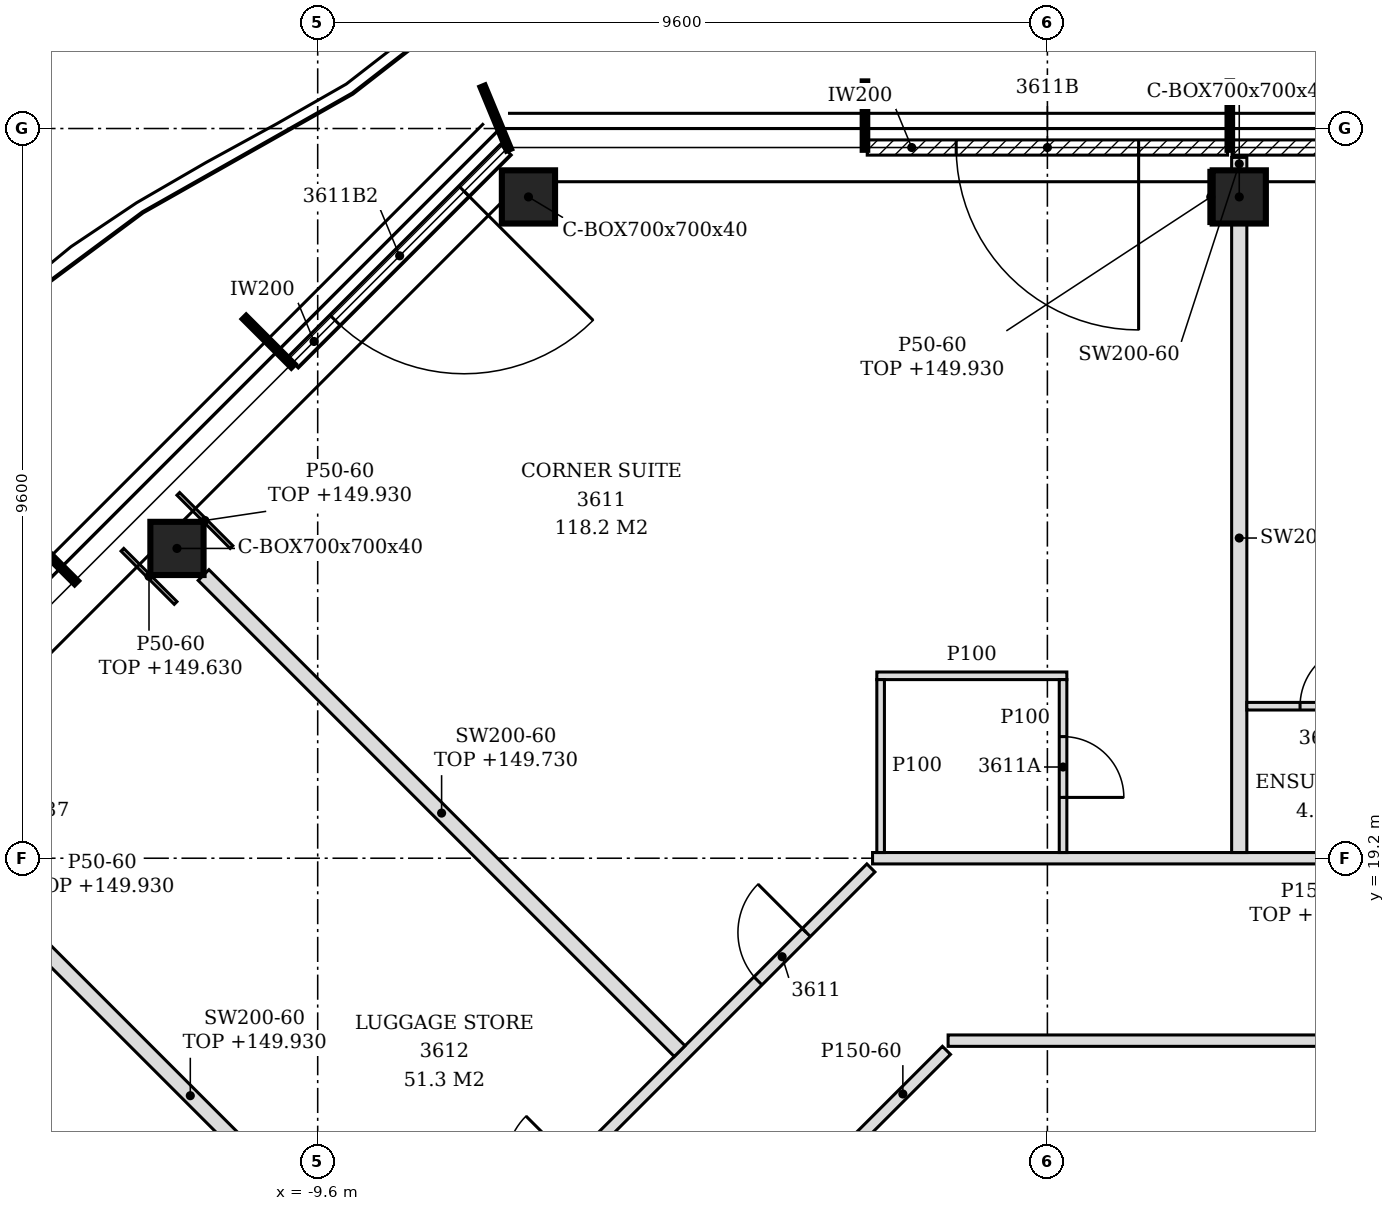
"""IFC4 building model, lengths in metres.
Left out: names, types, materials, properties, quantities, classifications, styles, units other than length and angle.
Written with IfcOpenShell. Run it as: python <this file> out.ifc"""

import sys

from ifc_helpers import new_model, si_unit, direction, frame, frame_2d, origin, origin_2d, place, context, subcontext, project, spatial, polyline, rectangle, hollow_rectangle, outline, extrude, element, fill, save


model = new_model("IFC4")
c1 = context("Model", 3, precision=1e-05, world=origin(), true_north=direction((0.0, 1.0)))
c2 = subcontext(c1, "Body", "Model", "MODEL_VIEW")
j1 = project(units=[si_unit("LENGTHUNIT", "METRE"), si_unit("PLANEANGLEUNIT", "RADIAN")], contexts=[c1])
p1 = place(None, origin())
s1 = spatial("IfcSite", under=j1, at=p1, CompositionType="ELEMENT")
p2 = place(p1, origin())
s2 = spatial("IfcBuilding", under=s1, at=p2, CompositionType="ELEMENT")
p3 = place(p2, frame((0.0, 0.0, 147.0)))
s3 = spatial("IfcBuildingStorey", under=s2, at=p3, CompositionType="ELEMENT", Elevation=147.0)
for number, where, z_axis, x_axis in (
    (1, (2.524, 27.9, -0.15), (0.0, 0.0, 1.0), (1.0, 0.0, 0.0)),
    (2, (-6.827, 27.9, -0.15), (0.0, 0.0, 1.0), (1.0, 0.0, 0.0)),
    (3, (-11.451, 23.276, -0.15), (0.0, 0.0, 1.0), (1.0, 0.0, 0.0)),
):
    element("IfcColumn", number, at=place(p3, frame(where, z_axis=z_axis, x_axis=x_axis)), inside=s3, PredefinedType="COLUMN", context=c2, shape_type="SweptSolid", body=[
        extrude(hollow_rectangle(XDim=0.7, YDim=0.7, WallThickness=0.04, at=origin_2d()), origin(), (0.0, 0.0, 1.0), 3.6),
    ])
p4 = place(p3, frame((7.17, 28.55, 0.0), z_axis=(0.0, 0.0, 1.0), x_axis=(-1.0, 0.0, 0.0)))
e4 = element("IfcWall", 4, at=p4, inside=s3, PredefinedType="NOTDEFINED", context=c2, shape_type="SweptSolid", body=[
    extrude(rectangle(XDim=4.74, YDim=0.2, at=frame_2d((2.37, 0.0))), origin(), (0.0, 0.0, 1.0), 3.45),
])
p5 = place(p4, frame((1.17, 0.0, 0.0)))
e5 = element("IfcOpeningElement", 5, at=p5, cuts=e4, PredefinedType="OPENING", context=c2, shape_type="SweptSolid", body=[
    extrude(rectangle(XDim=2.4, YDim=2.4, at=frame_2d((1.2, 1.2))), frame((0.0, 0.11, 0.0), z_axis=(0.0, -1.0, 0.0), x_axis=(1.0, 0.0, 0.0)), (0.0, 0.0, 1.0), 0.22),
])
p6 = place(p3, frame((2.37, 28.55, 0.0), z_axis=(0.0, 0.0, 1.0), x_axis=(-1.0, 0.0, 0.0)))
e6 = element("IfcWall", 6, at=p6, inside=s3, PredefinedType="NOTDEFINED", context=c2, shape_type="SweptSolid", body=[
    extrude(rectangle(XDim=4.74, YDim=0.2, at=frame_2d((2.37, 0.0))), origin(), (0.0, 0.0, 1.0), 3.45),
])
p7 = place(p6, frame((1.17, 0.0, 0.0)))
e7 = element("IfcOpeningElement", 7, at=p7, cuts=e6, PredefinedType="OPENING", context=c2, shape_type="SweptSolid", body=[
    extrude(rectangle(XDim=2.4, YDim=2.4, at=frame_2d((1.2, 1.2))), frame((0.0, 0.11, 0.0), z_axis=(0.0, -1.0, 0.0), x_axis=(1.0, 0.0, 0.0)), (0.0, 0.0, 1.0), 0.22),
])
p8 = place(p3, frame((-7.125, 28.522, 0.0), z_axis=(0.0, 0.0, 1.0), x_axis=(-0.707106781187, -0.707106781187, 0.0)))
e8 = element("IfcWall", 8, at=p8, inside=s3, PredefinedType="NOTDEFINED", context=c2, shape_type="SweptSolid", body=[
    extrude(rectangle(XDim=3.962, YDim=0.2, at=frame_2d((1.981, 0.0))), origin(), (0.0, 0.0, 1.0), 3.45),
])
p9 = place(p8, frame((0.775, 0.0, 0.0)))
e9 = element("IfcOpeningElement", 9, at=p9, cuts=e8, PredefinedType="OPENING", context=c2, shape_type="SweptSolid", body=[
    extrude(rectangle(XDim=2.4, YDim=2.4, at=frame_2d((1.2, 1.2))), frame((0.0, 0.11, 0.0), z_axis=(0.0, -1.0, 0.0), x_axis=(1.0, 0.0, 0.0)), (0.0, 0.0, 1.0), 0.22),
])
p10 = place(p3, frame((-12.075, 9.319, 0.0), z_axis=(0.0, 0.0, 1.0), x_axis=(0.707106781187, 0.707106781187, 0.0)))
e10 = element("IfcWall", 10, at=p10, inside=s3, PredefinedType="PARTITIONING", context=c2, shape_type="SweptSolid", body=[
    extrude(rectangle(XDim=13.793, YDim=0.15, at=frame_2d((6.896, 0.0))), origin(), (0.0, 0.0, 1.0), 2.73),
])
p11 = place(p10, frame((11.692, 0.0, 0.0)))
e11 = element("IfcOpeningElement", 11, at=p11, cuts=e10, PredefinedType="OPENING", context=c2, shape_type="SweptSolid", body=[
    extrude(rectangle(XDim=0.9, YDim=2.1, at=frame_2d((0.45, 1.05))), frame((0.0, 0.085, 0.0), z_axis=(0.0, -1.0, 0.0), x_axis=(1.0, 0.0, 0.0)), (0.0, 0.0, 1.0), 0.17),
])
p12 = place(p10, frame((7.376, 0.0, 0.0)))
e12 = element("IfcOpeningElement", 12, at=p12, cuts=e10, PredefinedType="OPENING", context=c2, shape_type="SweptSolid", body=[
    extrude(rectangle(XDim=0.9, YDim=2.1, at=frame_2d((0.45, 1.05))), frame((0.0, 0.085, 0.0), z_axis=(0.0, -1.0, 0.0), x_axis=(1.0, 0.0, 0.0)), (0.0, 0.0, 1.0), 0.17),
])
p13 = place(p10, frame((3.62, 0.0, 0.0)))
e13 = element("IfcOpeningElement", 13, at=p13, cuts=e10, PredefinedType="OPENING", context=c2, shape_type="SweptSolid", body=[
    extrude(rectangle(XDim=0.9, YDim=2.1, at=frame_2d((0.45, 1.05))), frame((0.0, 0.085, 0.0), z_axis=(0.0, -1.0, 0.0), x_axis=(1.0, 0.0, 0.0)), (0.0, 0.0, 1.0), 0.17),
])
p14 = place(p3, frame((-8.35, 13.15, 0.0), z_axis=(0.0, 0.0, 1.0), x_axis=(-0.707092030896, 0.707121531169, 0.0)))
e14 = element("IfcWall", 14, at=p14, inside=s3, PredefinedType="PARTITIONING", context=c2, shape_type="SweptSolid", body=[
    extrude(rectangle(XDim=8.276, YDim=0.2, at=frame_2d((4.138, 0.0))), origin(), (0.0, 0.0, 1.0), 2.93),
])
p15 = place(p3, frame((-2.475, 15.525, 0.0), z_axis=(0.0, 0.0, 1.0), x_axis=(0.707106781187, 0.707106781187, 0.0)))
e15 = element("IfcWall", 15, at=p15, inside=s3, PredefinedType="PARTITIONING", context=c2, shape_type="SweptSolid", body=[
    extrude(rectangle(XDim=1.622, YDim=0.15, at=frame_2d((0.811, 0.0))), origin(), (0.0, 0.0, 1.0), 3.45),
])
p16 = place(p3, frame((-4.838, 16.662, 0.0), z_axis=(0.0, 0.0, 1.0), x_axis=(-0.707120561855, 0.707093000249, 0.0)))
e16 = element("IfcWall", 16, at=p16, inside=s3, PredefinedType="PARTITIONING", context=c2, shape_type="SweptSolid", body=[
    extrude(rectangle(XDim=8.858, YDim=0.2, at=frame_2d((4.429, 0.0))), origin(), (0.0, 0.0, 1.0), 2.73),
])
p17 = place(p3, frame((-1.306, 16.8, 0.0), z_axis=(0.0, 0.0, 1.0), x_axis=(1.0, 0.0, 0.0)))
e17 = element("IfcWall", 17, at=p17, inside=s3, PredefinedType="PARTITIONING", context=c2, shape_type="SweptSolid", body=[
    extrude(outline(polyline([(0.0, 0.0), (16.806, 0.0), (16.806, 3.45), (8.656, 3.45), (8.654, 2.73), (8.356, 2.73), (8.354, 3.45), (0.0, 3.45), (0.0, 0.0)])), frame((0.0, 0.075, 0.0), z_axis=(0.0, -1.0, 0.0), x_axis=(1.0, 0.0, 0.0)), (0.0, 0.0, 1.0), 0.15),
])
p18 = place(p17, frame((15.006, 0.0, 0.0)))
e18 = element("IfcOpeningElement", 18, at=p18, cuts=e17, PredefinedType="OPENING", context=c2, shape_type="SweptSolid", body=[
    extrude(rectangle(XDim=0.8, YDim=2.1, at=frame_2d((0.4, 1.05))), frame((0.0, 0.085, 0.0), z_axis=(0.0, -1.0, 0.0), x_axis=(1.0, 0.0, 0.0)), (0.0, 0.0, 1.0), 0.17),
])
p19 = place(p17, frame((12.456, 0.0, 0.0)))
e19 = element("IfcOpeningElement", 19, at=p19, cuts=e17, PredefinedType="OPENING", context=c2, shape_type="SweptSolid", body=[
    extrude(rectangle(XDim=0.8, YDim=2.1, at=frame_2d((0.4, 1.05))), frame((0.0, 0.085, 0.0), z_axis=(0.0, -1.0, 0.0), x_axis=(1.0, 0.0, 0.0)), (0.0, 0.0, 1.0), 0.17),
])
p20 = place(p3, frame((-2.3, 19.2, 0.0), z_axis=(0.0, 0.0, 1.0), x_axis=(1.0, 0.0, 0.0)))
e20 = element("IfcWall", 20, at=p20, inside=s3, PredefinedType="PARTITIONING", context=c2, shape_type="SweptSolid", body=[
    extrude(outline(polyline([(0.0, 0.0), (19.0, 0.0), (19.0, 2.88), (9.65, 2.88), (9.648, 2.73), (9.35, 2.73), (9.348, 2.88), (0.0, 2.88), (0.0, 0.0)])), frame((0.0, 0.075, 0.0), z_axis=(0.0, -1.0, 0.0), x_axis=(1.0, 0.0, 0.0)), (0.0, 0.0, 1.0), 0.15),
])
p21 = place(p20, frame((11.809, 0.0, 0.0)))
e21 = element("IfcOpeningElement", 21, at=p21, cuts=e20, PredefinedType="OPENING", context=c2, shape_type="SweptSolid", body=[
    extrude(rectangle(XDim=0.9, YDim=2.1, at=frame_2d((0.45, 1.05))), frame((0.0, 0.085, 0.0), z_axis=(0.0, -1.0, 0.0), x_axis=(1.0, 0.0, 0.0)), (0.0, 0.0, 1.0), 0.17),
])
p22 = place(p3, frame((-2.194, 19.275, 0.0), z_axis=(0.0, 0.0, 1.0), x_axis=(0.0, 1.0, 0.0)))
e22 = element("IfcWall", 22, at=p22, inside=s3, PredefinedType="PARTITIONING", context=c2, shape_type="SweptSolid", body=[
    extrude(outline(polyline([(0.0, 0.0), (2.275, 0.0), (2.275, 3.45), (0.03, 3.45), (0.028, 2.88), (0.0, 2.88), (0.0, 0.0)])), frame((0.0, 0.05, 0.0), z_axis=(0.0, -1.0, 0.0), x_axis=(1.0, 0.0, 0.0)), (0.0, 0.0, 1.0), 0.1),
])
p23 = place(p3, frame((0.206, 19.275, 0.0), z_axis=(0.0, 0.0, 1.0), x_axis=(0.0, 1.0, 0.0)))
e23 = element("IfcWall", 23, at=p23, inside=s3, PredefinedType="PARTITIONING", context=c2, shape_type="SweptSolid", body=[
    extrude(outline(polyline([(0.0, 0.0), (2.275, 0.0), (2.275, 3.45), (0.03, 3.45), (0.028, 2.88), (0.0, 2.88), (0.0, 0.0)])), frame((0.0, 0.05, 0.0), z_axis=(0.0, -1.0, 0.0), x_axis=(1.0, 0.0, 0.0)), (0.0, 0.0, 1.0), 0.1),
])
p24 = place(p23, frame((0.725, 0.0, 0.0)))
e24 = element("IfcOpeningElement", 24, at=p24, cuts=e23, PredefinedType="OPENING", context=c2, shape_type="SweptSolid", body=[
    extrude(rectangle(XDim=0.8, YDim=2.1, at=frame_2d((0.4, 1.05))), frame((0.0, 0.06, 0.0), z_axis=(0.0, -1.0, 0.0), x_axis=(1.0, 0.0, 0.0)), (0.0, 0.0, 1.0), 0.12),
])
p25 = place(p3, frame((2.524, 19.275, 0.0), z_axis=(0.0, 0.0, 1.0), x_axis=(0.0, 1.0, 0.0)))
e25 = element("IfcWall", 25, at=p25, inside=s3, PredefinedType="PARTITIONING", context=c2, shape_type="SweptSolid", body=[
    extrude(outline(polyline([(0.0, 0.0), (8.275, 0.0), (8.275, 3.45), (4.83, 3.45), (4.828, 2.88), (4.62, 2.88), (4.618, 3.45), (0.03, 3.45), (0.028, 2.88), (0.0, 2.88), (0.0, 0.0)])), frame((0.0, 0.1, 0.0), z_axis=(0.0, -1.0, 0.0), x_axis=(1.0, 0.0, 0.0)), (0.0, 0.0, 1.0), 0.2),
])
p26 = place(p3, frame((2.624, 21.2, 0.0), z_axis=(0.0, 0.0, 1.0), x_axis=(1.0, 0.0, 0.0)))
e26 = element("IfcWall", 26, at=p26, inside=s3, PredefinedType="PARTITIONING", context=c2, shape_type="SweptSolid", body=[
    extrude(rectangle(XDim=2.35, YDim=0.1, at=frame_2d((1.175, 0.0))), origin(), (0.0, 0.0, 1.0), 3.45),
])
p27 = place(p26, frame((0.7, 0.0, 0.0)))
e27 = element("IfcOpeningElement", 27, at=p27, cuts=e26, PredefinedType="OPENING", context=c2, shape_type="SweptSolid", body=[
    extrude(rectangle(XDim=0.8, YDim=2.1, at=frame_2d((0.4, 1.05))), frame((0.0, 0.06, 0.0), z_axis=(0.0, -1.0, 0.0), x_axis=(1.0, 0.0, 0.0)), (0.0, 0.0, 1.0), 0.12),
])
p28 = place(p3, frame((-2.244, 21.6, 0.0), z_axis=(0.0, 0.0, 1.0), x_axis=(1.0, 0.0, 0.0)))
e28 = element("IfcWall", 28, at=p28, inside=s3, PredefinedType="PARTITIONING", context=c2, shape_type="SweptSolid", body=[
    extrude(rectangle(XDim=2.5, YDim=0.1, at=frame_2d((1.25, 0.0))), origin(), (0.0, 0.0, 1.0), 3.45),
])
p29 = place(p3, frame((2.524, 28.25, 0.0), z_axis=(0.0, 0.0, 1.0), x_axis=(0.0, 1.0, 0.0)))
e29 = element("IfcWall", 29, at=p29, inside=s3, PredefinedType="PARTITIONING", context=c2, shape_type="SweptSolid", body=[
    extrude(rectangle(XDim=0.17, YDim=0.2, at=frame_2d((0.085, 0.0))), origin(), (0.0, 0.0, 1.0), 3.45),
])
p30 = place(p3, frame((-11.469, 22.558, 0.0), z_axis=(0.0, 0.0, 1.0), x_axis=(-0.707106781187, 0.707106781187, 0.0)))
e30 = element("IfcWall", 30, at=p30, inside=s3, PredefinedType="PARTITIONING", context=c2, shape_type="SweptSolid", body=[
    extrude(rectangle(XDim=0.99, YDim=0.05, at=frame_2d((0.495, 0.0))), origin(), (0.0, 0.0, 1.0), 2.63),
])
p31 = place(p3, frame((-10.734, 23.293, 0.0), z_axis=(0.0, 0.0, 1.0), x_axis=(-0.707106781187, 0.707106781187, 0.0)))
e31 = element("IfcWall", 31, at=p31, inside=s3, PredefinedType="PARTITIONING", context=c2, shape_type="SweptSolid", body=[
    extrude(rectangle(XDim=0.99, YDim=0.05, at=frame_2d((0.495, 0.0))), origin(), (0.0, 0.0, 1.0), 2.93),
])
p32 = place(p3, frame((2.149, 27.55, 0.0), z_axis=(0.0, 0.0, 1.0), x_axis=(0.0, 1.0, 0.0)))
e32 = element("IfcWall", 32, at=p32, inside=s3, PredefinedType="PARTITIONING", context=c2, shape_type="SweptSolid", body=[
    extrude(rectangle(XDim=0.7, YDim=0.05, at=frame_2d((0.35, 0.0))), origin(), (0.0, 0.0, 1.0), 2.93),
])
p33 = place(p7, origin())
e33 = element("IfcDoor", 33, at=p33, inside=s3, OperationType="SINGLE_SWING_LEFT", PredefinedType="DOOR", context=c2, shape_type="SweptSolid", body=[
    extrude(rectangle(XDim=2.4, YDim=2.4, at=frame_2d((1.2, 1.2))), frame((0.0, 0.025, 0.0), z_axis=(0.0, -1.0, 0.0), x_axis=(1.0, 0.0, 0.0)), (0.0, 0.0, 1.0), 0.05),
])
fill(e7, e33)
p34 = place(p9, origin())
e34 = element("IfcDoor", 34, at=p34, inside=s3, OperationType="SINGLE_SWING_LEFT", PredefinedType="DOOR", context=c2, shape_type="SweptSolid", body=[
    extrude(rectangle(XDim=2.4, YDim=2.4, at=frame_2d((1.2, 1.2))), frame((0.0, 0.025, 0.0), z_axis=(0.0, -1.0, 0.0), x_axis=(1.0, 0.0, 0.0)), (0.0, 0.0, 1.0), 0.05),
])
fill(e9, e34)
p35 = place(p27, origin())
e35 = element("IfcDoor", 35, at=p35, inside=s3, OperationType="SINGLE_SWING_RIGHT", PredefinedType="DOOR", context=c2, shape_type="SweptSolid", body=[
    extrude(rectangle(XDim=0.8, YDim=2.1, at=frame_2d((0.4, 1.05))), frame((0.0, 0.025, 0.0), z_axis=(0.0, -1.0, 0.0), x_axis=(1.0, 0.0, 0.0)), (0.0, 0.0, 1.0), 0.05),
])
fill(e27, e35)
p36 = place(p11, origin())
e36 = element("IfcDoor", 36, at=p36, inside=s3, OperationType="SINGLE_SWING_RIGHT", PredefinedType="DOOR", context=c2, shape_type="SweptSolid", body=[
    extrude(rectangle(XDim=0.9, YDim=2.1, at=frame_2d((0.45, 1.05))), frame((0.0, 0.025, 0.0), z_axis=(0.0, -1.0, 0.0), x_axis=(1.0, 0.0, 0.0)), (0.0, 0.0, 1.0), 0.05),
])
fill(e11, e36)
p37 = place(p24, frame((0.8, 0.0, 0.0), z_axis=(0.0, 0.0, 1.0), x_axis=(-1.0, 0.0, 0.0)))
e37 = element("IfcDoor", 37, at=p37, inside=s3, OperationType="SINGLE_SWING_RIGHT", PredefinedType="DOOR", context=c2, shape_type="SweptSolid", body=[
    extrude(rectangle(XDim=0.8, YDim=2.1, at=frame_2d((0.4, 1.05))), frame((0.0, 0.025, 0.0), z_axis=(0.0, -1.0, 0.0), x_axis=(1.0, 0.0, 0.0)), (0.0, 0.0, 1.0), 0.05),
])
fill(e24, e37)
save(model, sys.argv[1])
